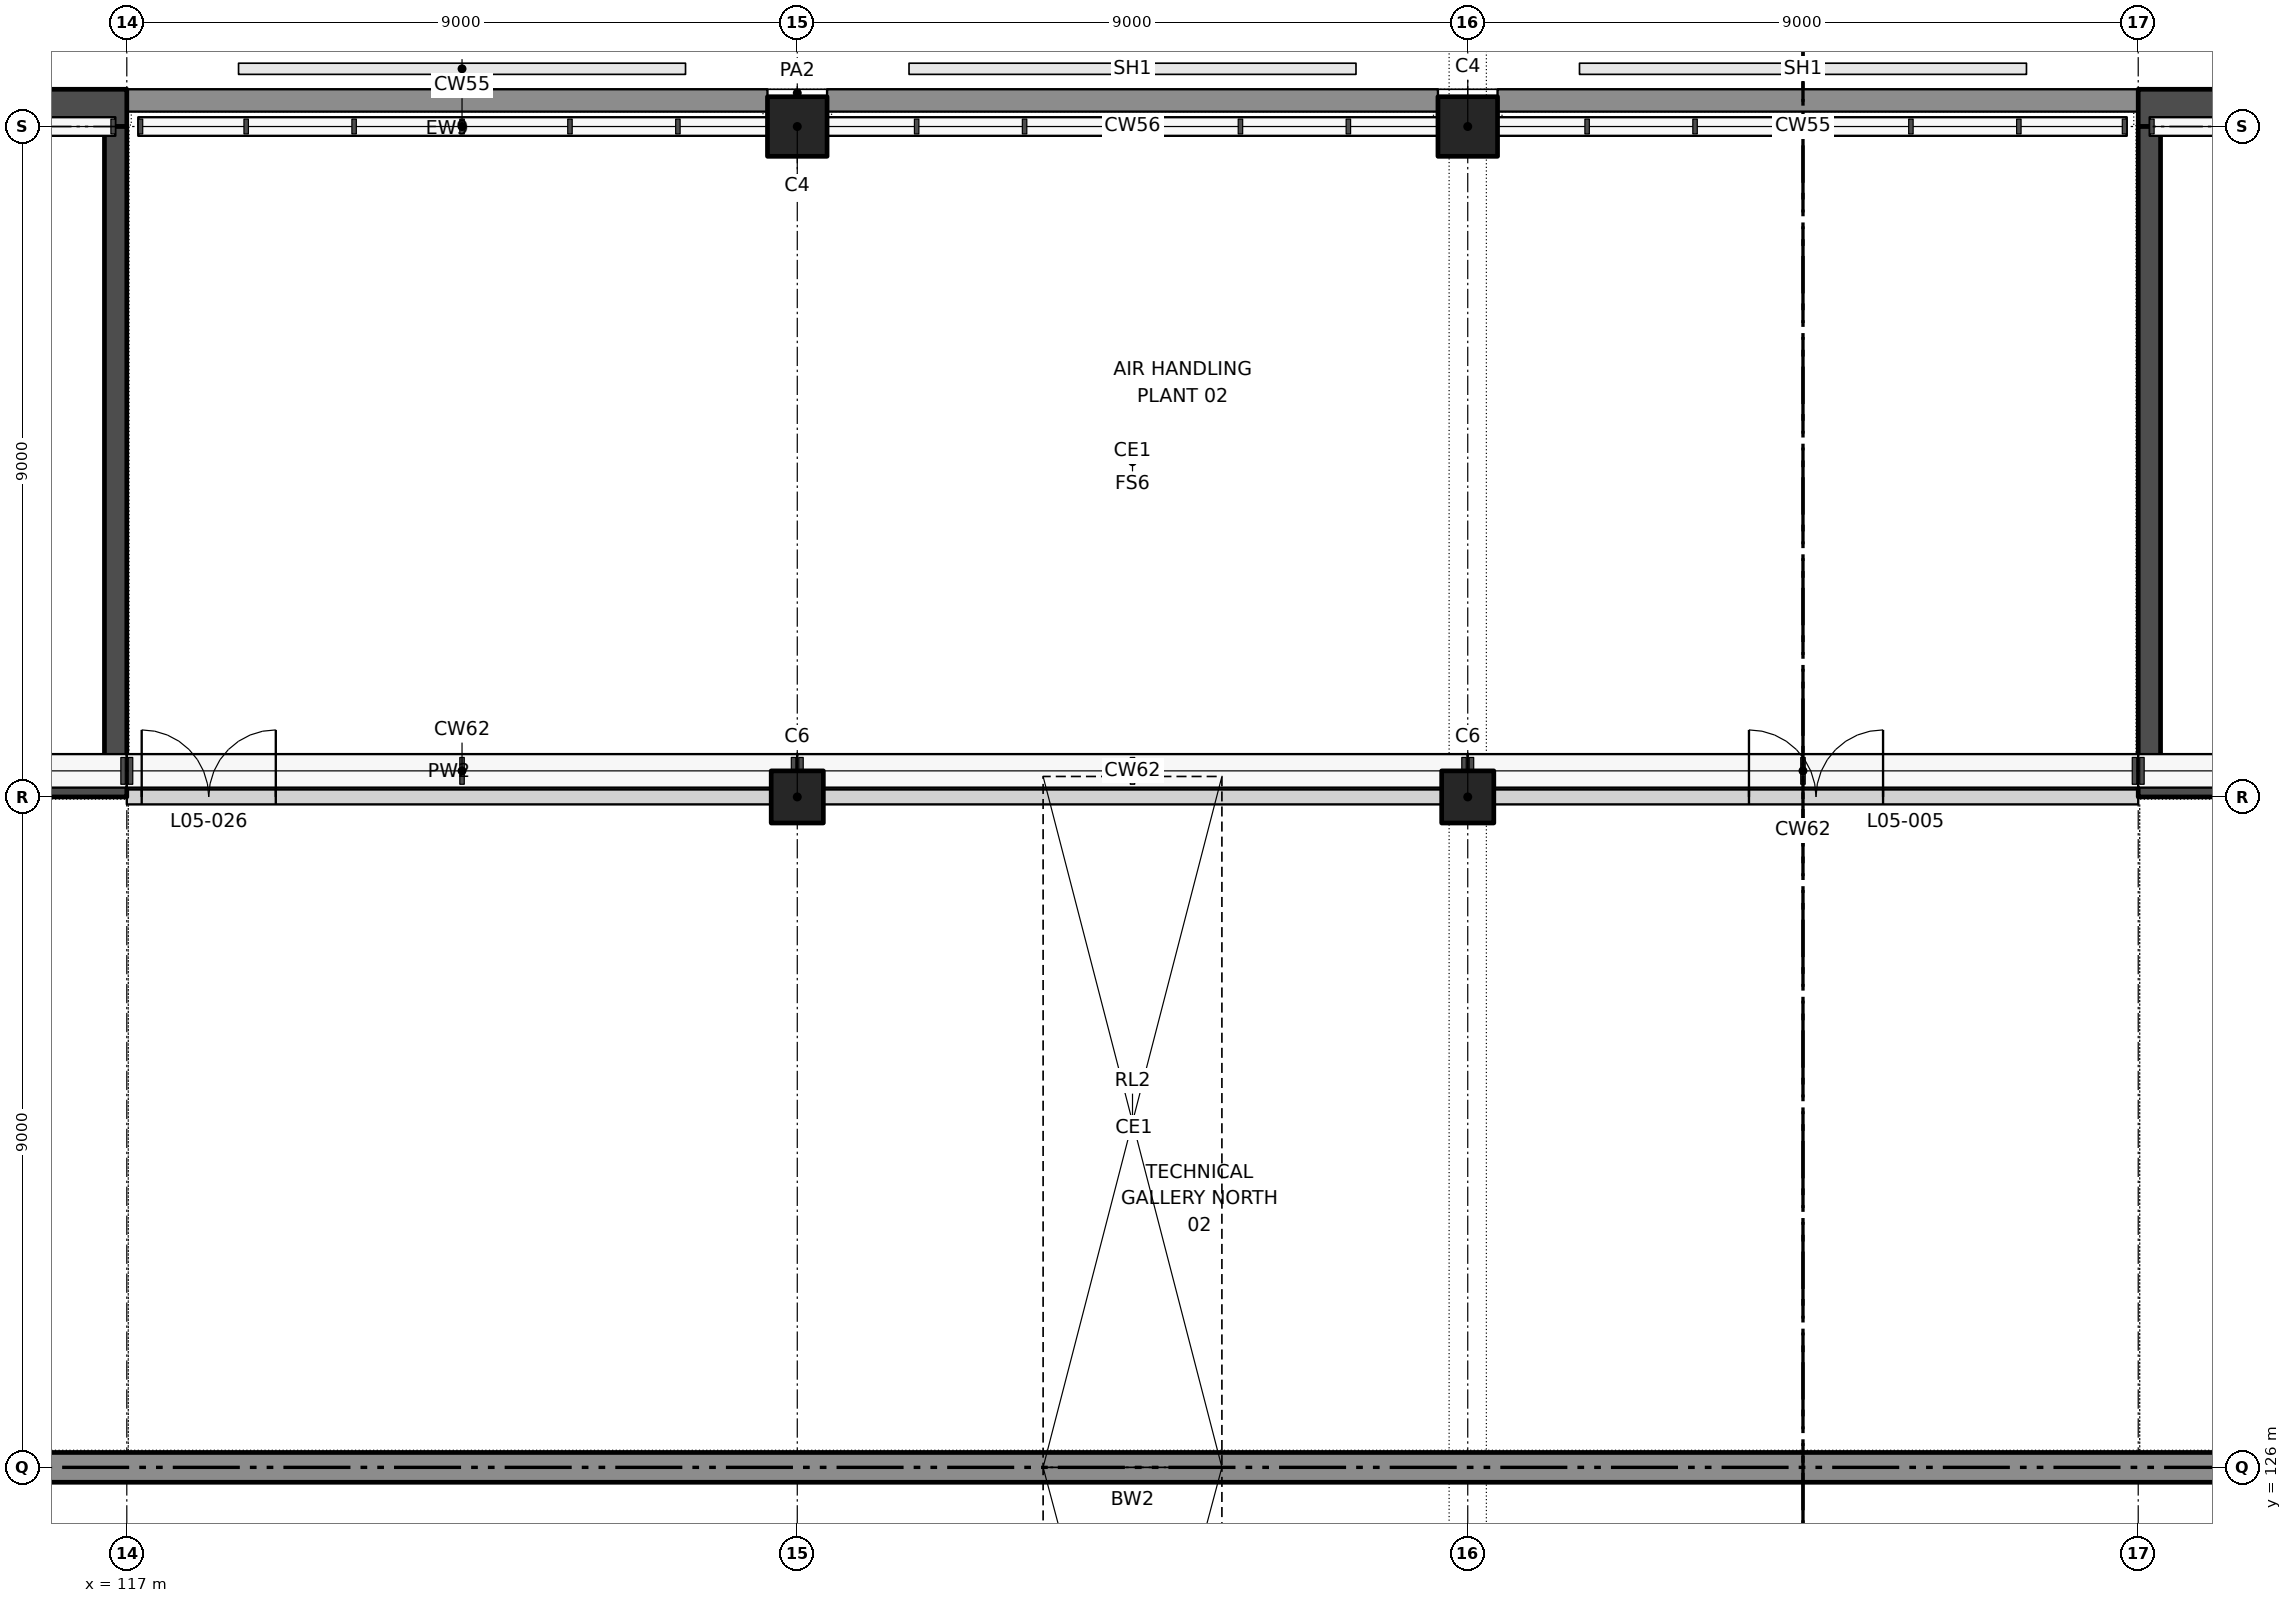
"""IFC4 building model, lengths in metres.
Left out: names, types, materials, properties, quantities, classifications, styles, units other than length and angle.
Written with IfcOpenShell. Run it as: python <this file> out.ifc"""

import sys

from ifc_helpers import new_model, si_unit, direction, frame, frame_2d, origin, origin_2d, place, context, subcontext, project, spatial, polyline, rectangle, outline, extrude, element, fill, save


model = new_model("IFC4")
c1 = context("Model", 3, precision=1e-05, world=origin(), true_north=direction((0.0, 1.0)))
c2 = subcontext(c1, "Body", "Model", "MODEL_VIEW")
j1 = project(units=[si_unit("LENGTHUNIT", "METRE"), si_unit("PLANEANGLEUNIT", "RADIAN")], contexts=[c1])
p1 = place(None, origin())
s1 = spatial("IfcSite", under=j1, at=p1, CompositionType="ELEMENT")
p2 = place(p1, origin())
s2 = spatial("IfcBuilding", under=s1, at=p2, CompositionType="ELEMENT")
p3 = place(p2, frame((0.0, 0.0, 33.5)))
s3 = spatial("IfcBuildingStorey", under=s2, at=p3, CompositionType="ELEMENT", Elevation=33.5)
for number, where, z_axis, x_axis in (
    (1, (126.0, 144.0, 0.0), (0.0, 0.0, 1.0), (1.0, 0.0, 0.0)),
    (2, (135.0, 144.0, 0.0), (0.0, 0.0, 1.0), (1.0, 0.0, 0.0)),
):
    element("IfcColumn", number, at=place(p3, frame(where, z_axis=z_axis, x_axis=x_axis)), inside=s3, PredefinedType="COLUMN", context=c2, shape_type="SweptSolid", body=[
        extrude(rectangle(XDim=0.8, YDim=0.8, at=origin_2d()), origin(), (0.0, 0.0, 1.0), 4.0),
    ])
for number, where, z_axis, x_axis in (
    (3, (126.0, 135.0, 0.0), (0.0, 0.0, 1.0), (1.0, 0.0, 0.0)),
    (4, (135.0, 135.0, 0.0), (0.0, 0.0, 1.0), (1.0, 0.0, 0.0)),
):
    element("IfcColumn", number, at=place(p3, frame(where, z_axis=z_axis, x_axis=x_axis)), inside=s3, PredefinedType="COLUMN", context=c2, shape_type="SweptSolid", body=[
        extrude(rectangle(XDim=0.7, YDim=0.7, at=origin_2d()), origin(), (0.0, 0.0, 1.0), 4.0),
    ])
p4 = place(p3, frame((171.0, 126.0, 0.0), z_axis=(0.0, 0.0, 1.0), x_axis=(-1.0, 0.0, 0.0)))
e5 = element("IfcWall", 5, at=p4, inside=s3, PredefinedType="SOLIDWALL", context=c2, shape_type="SweptSolid", body=[
    extrude(rectangle(XDim=81.0, YDim=0.4, at=frame_2d((40.5, 0.0))), origin(), (0.0, 0.0, 1.0), 4.0),
])
p5 = place(p4, frame((75.9, 0.0, 0.0)))
e6 = element("IfcOpeningElement", 6, at=p5, cuts=e5, PredefinedType="OPENING", context=c2, shape_type="SweptSolid", body=[
    extrude(rectangle(XDim=1.2, YDim=2.1, at=frame_2d((0.6, 1.05))), frame((0.0, 0.21, 0.0), z_axis=(0.0, -1.0, 0.0), x_axis=(1.0, 0.0, 0.0)), (0.0, 0.0, 1.0), 0.42),
])
p6 = place(p4, frame((3.9, 0.0, 0.0)))
e7 = element("IfcOpeningElement", 7, at=p6, cuts=e5, PredefinedType="OPENING", context=c2, shape_type="SweptSolid", body=[
    extrude(rectangle(XDim=1.2, YDim=2.1, at=frame_2d((0.6, 1.05))), frame((0.0, 0.21, 0.0), z_axis=(0.0, -1.0, 0.0), x_axis=(1.0, 0.0, 0.0)), (0.0, 0.0, 1.0), 0.42),
])
p7 = place(p3, frame((135.35, 135.0, 0.0), z_axis=(0.0, 0.0, 1.0), x_axis=(1.0, 0.0, 0.0)))
e8 = element("IfcWall", 8, at=p7, inside=s3, PredefinedType="PARTITIONING", context=c2, shape_type="SweptSolid", body=[
    extrude(rectangle(XDim=8.65, YDim=0.2, at=frame_2d((4.325, 0.0))), origin(), (0.0, 0.0, 1.0), 4.0),
])
p8 = place(p7, frame((3.425, 0.0, 0.0)))
e9 = element("IfcOpeningElement", 9, at=p8, cuts=e8, PredefinedType="OPENING", context=c2, shape_type="SweptSolid", body=[
    extrude(rectangle(XDim=1.8, YDim=2.1, at=frame_2d((0.9, 1.05))), frame((0.0, 0.11, 0.0), z_axis=(0.0, -1.0, 0.0), x_axis=(1.0, 0.0, 0.0)), (0.0, 0.0, 1.0), 0.22),
])
p9 = place(p3, frame((126.35, 135.0, 0.0), z_axis=(0.0, 0.0, 1.0), x_axis=(1.0, 0.0, 0.0)))
e10 = element("IfcWall", 10, at=p9, inside=s3, PredefinedType="PARTITIONING", context=c2, shape_type="SweptSolid", body=[
    extrude(rectangle(XDim=8.3, YDim=0.2, at=frame_2d((4.15, 0.0))), origin(), (0.0, 0.0, 1.0), 4.0),
])
p10 = place(p3, frame((117.0, 135.0, 0.0), z_axis=(0.0, 0.0, 1.0), x_axis=(1.0, 0.0, 0.0)))
e11 = element("IfcWall", 11, at=p10, inside=s3, PredefinedType="PARTITIONING", context=c2, shape_type="SweptSolid", body=[
    extrude(rectangle(XDim=8.65, YDim=0.2, at=frame_2d((4.325, 0.0))), origin(), (0.0, 0.0, 1.0), 4.0),
])
p11 = place(p10, frame((0.2, 0.0, 0.0)))
e12 = element("IfcOpeningElement", 12, at=p11, cuts=e11, PredefinedType="OPENING", context=c2, shape_type="SweptSolid", body=[
    extrude(rectangle(XDim=1.8, YDim=2.1, at=frame_2d((0.9, 1.05))), frame((0.0, 0.11, 0.0), z_axis=(0.0, -1.0, 0.0), x_axis=(1.0, 0.0, 0.0)), (0.0, 0.0, 1.0), 0.22),
])
p12 = place(p3, frame((125.6, 144.35, 0.0), z_axis=(0.0, 0.0, 1.0), x_axis=(-1.0, 0.0, 0.0)))
e13 = element("IfcWall", 13, at=p12, inside=s3, PredefinedType="SOLIDWALL", context=c2, shape_type="SweptSolid", body=[
    extrude(rectangle(XDim=8.6, YDim=0.3, at=frame_2d((4.3, 0.0))), origin(), (0.0, 0.0, 1.0), 4.0),
])
p13 = place(p3, frame((134.6, 144.35, 0.0), z_axis=(0.0, 0.0, 1.0), x_axis=(-1.0, 0.0, 0.0)))
e14 = element("IfcWall", 14, at=p13, inside=s3, PredefinedType="SOLIDWALL", context=c2, shape_type="SweptSolid", body=[
    extrude(rectangle(XDim=8.2, YDim=0.3, at=frame_2d((4.1, 0.0))), origin(), (0.0, 0.0, 1.0), 4.0),
])
p14 = place(p3, frame((144.0, 144.35, 0.0), z_axis=(0.0, 0.0, 1.0), x_axis=(-1.0, 0.0, 0.0)))
e15 = element("IfcWall", 15, at=p14, inside=s3, PredefinedType="SOLIDWALL", context=c2, shape_type="SweptSolid", body=[
    extrude(rectangle(XDim=8.6, YDim=0.3, at=frame_2d((4.3, 0.0))), origin(), (0.0, 0.0, 1.0), 4.0),
])
p15 = place(p3, frame((117.0, 135.15, 0.0), z_axis=(0.0, 0.0, 1.0), x_axis=(-1.0, 0.0, 0.0)))
e16 = element("IfcWall", 16, at=p15, inside=s3, PredefinedType="SHEAR", context=c2, shape_type="SweptSolid", body=[
    extrude(rectangle(XDim=18.0, YDim=0.3, at=frame_2d((9.0, 0.0))), origin(), (0.0, 0.0, 1.0), 4.0),
])
p16 = place(p15, frame((8.6, 0.0, 0.0)))
e17 = element("IfcOpeningElement", 17, at=p16, cuts=e16, PredefinedType="OPENING", context=c2, shape_type="SweptSolid", body=[
    extrude(rectangle(XDim=1.2, YDim=2.1, at=frame_2d((0.6, 1.05))), frame((0.0, 0.16, 0.0), z_axis=(0.0, -1.0, 0.0), x_axis=(1.0, 0.0, 0.0)), (0.0, 0.0, 1.0), 0.32),
])
p17 = place(p3, frame((117.0, 144.25, 0.0), z_axis=(0.0, 0.0, 1.0), x_axis=(-1.0, 0.0, 0.0)))
e18 = element("IfcWall", 18, at=p17, inside=s3, PredefinedType="SHEAR", context=c2, shape_type="SweptSolid", body=[
    extrude(rectangle(XDim=18.0, YDim=0.5, at=frame_2d((9.0, 0.0))), origin(), (0.0, 0.0, 1.0), 4.0),
])
p18 = place(p3, frame((116.85, 135.3, 0.0), z_axis=(0.0, 0.0, 1.0), x_axis=(0.0, 1.0, 0.0)))
e19 = element("IfcWall", 19, at=p18, inside=s3, PredefinedType="SHEAR", context=c2, shape_type="SweptSolid", body=[
    extrude(rectangle(XDim=8.7, YDim=0.3, at=frame_2d((4.35, 0.0))), origin(), (0.0, 0.0, 1.0), 4.0),
])
p19 = place(p3, frame((144.0, 135.15, 0.0), z_axis=(0.0, 0.0, 1.0), x_axis=(1.0, 0.0, 0.0)))
e20 = element("IfcWall", 20, at=p19, inside=s3, PredefinedType="SHEAR", context=c2, shape_type="SweptSolid", body=[
    extrude(rectangle(XDim=18.0, YDim=0.3, at=frame_2d((9.0, 0.0))), origin(), (0.0, 0.0, 1.0), 4.0),
])
p20 = place(p19, frame((8.6, 0.0, 0.0)))
e21 = element("IfcOpeningElement", 21, at=p20, cuts=e20, PredefinedType="OPENING", context=c2, shape_type="SweptSolid", body=[
    extrude(rectangle(XDim=1.2, YDim=2.1, at=frame_2d((0.6, 1.05))), frame((0.0, 0.16, 0.0), z_axis=(0.0, -1.0, 0.0), x_axis=(1.0, 0.0, 0.0)), (0.0, 0.0, 1.0), 0.32),
])
p21 = place(p3, frame((144.0, 144.25, 0.0), z_axis=(0.0, 0.0, 1.0), x_axis=(1.0, 0.0, 0.0)))
e22 = element("IfcWall", 22, at=p21, inside=s3, PredefinedType="SHEAR", context=c2, shape_type="SweptSolid", body=[
    extrude(rectangle(XDim=18.0, YDim=0.5, at=frame_2d((9.0, 0.0))), origin(), (0.0, 0.0, 1.0), 4.0),
])
p22 = place(p3, frame((144.15, 135.3, 0.0), z_axis=(0.0, 0.0, 1.0), x_axis=(0.0, 1.0, 0.0)))
e23 = element("IfcWall", 23, at=p22, inside=s3, PredefinedType="SHEAR", context=c2, shape_type="SweptSolid", body=[
    extrude(rectangle(XDim=8.7, YDim=0.3, at=frame_2d((4.35, 0.0))), origin(), (0.0, 0.0, 1.0), 4.0),
])
p23 = place(p8, origin())
e24 = element("IfcDoor", 24, at=p23, inside=s3, OperationType="DOUBLE_DOOR_DOUBLE_SWING", PredefinedType="DOOR", context=c2, shape_type="SweptSolid", body=[
    extrude(rectangle(XDim=1.8, YDim=2.1, at=frame_2d((0.9, 1.05))), frame((0.0, 0.025, 0.0), z_axis=(0.0, -1.0, 0.0), x_axis=(1.0, 0.0, 0.0)), (0.0, 0.0, 1.0), 0.05),
])
fill(e9, e24)
p24 = place(p11, origin())
e25 = element("IfcDoor", 25, at=p24, inside=s3, OperationType="DOUBLE_DOOR_DOUBLE_SWING", PredefinedType="DOOR", context=c2, shape_type="SweptSolid", body=[
    extrude(rectangle(XDim=1.8, YDim=2.1, at=frame_2d((0.9, 1.05))), frame((0.0, 0.025, 0.0), z_axis=(0.0, -1.0, 0.0), x_axis=(1.0, 0.0, 0.0)), (0.0, 0.0, 1.0), 0.05),
])
fill(e12, e25)
p25 = place(p2, frame((0.0, 0.0, 47.1)))
p26 = place(p25, frame((80.425, 81.01, 13.05), z_axis=(0.0, 0.072032280133, 0.99740230129), x_axis=(1.0, 0.0, 0.0)))
p27 = place(p26, origin())
e26 = element("IfcWindow", 26, at=p27, inside=s3, PartitioningType="SINGLE_PANEL", PredefinedType="SKYLIGHT", context=c2, shape_type="SweptSolid", body=[
    extrude(outline(polyline([(48.875, 36.084), (51.275, 36.084), (51.275, 45.107), (48.875, 45.107), (48.875, 36.084)])), origin(), (0.0, 0.0, -1.0), 0.05),
])
p28 = place(p26, origin())
e27 = element("IfcWindow", 27, at=p28, inside=s3, PartitioningType="SINGLE_PANEL", PredefinedType="SKYLIGHT", context=c2, shape_type="SweptSolid", body=[
    extrude(outline(polyline([(48.875, 45.107), (51.275, 45.107), (51.275, 54.406), (48.875, 54.406), (48.875, 45.107)])), origin(), (0.0, 0.0, -1.0), 0.05),
])
save(model, sys.argv[1])
